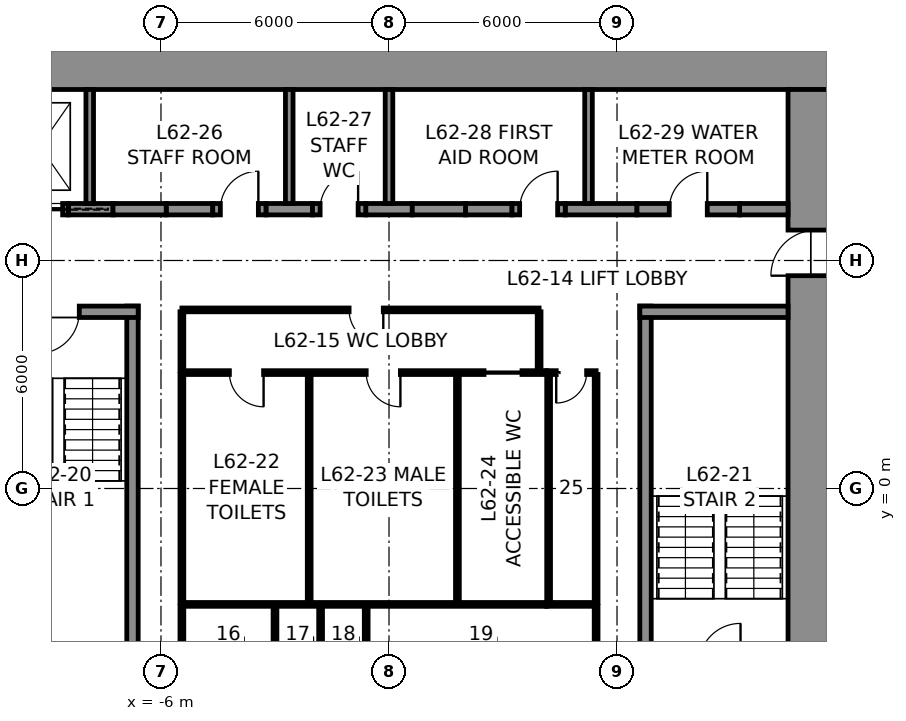
"""IFC4 building model, lengths in metres.
Left out: names, types, materials, properties, quantities, classifications, styles, units other than length and angle.
Written with IfcOpenShell. Run it as: python <this file> out.ifc"""

import sys

from ifc_helpers import new_model, si_unit, direction, frame, frame_2d, origin, place, context, subcontext, project, spatial, rectangle, extrude, element, fill, save


model = new_model("IFC4")
c1 = context("Model", 3, precision=1e-05, world=origin(), true_north=direction((0.0, 1.0)))
c2 = subcontext(c1, "Body", "Model", "MODEL_VIEW")
j1 = project(units=[si_unit("LENGTHUNIT", "METRE"), si_unit("PLANEANGLEUNIT", "RADIAN")], contexts=[c1])
p1 = place(None, origin())
s1 = spatial("IfcSite", under=j1, at=p1, CompositionType="ELEMENT")
p2 = place(p1, origin())
s2 = spatial("IfcBuilding", under=s1, at=p2, CompositionType="ELEMENT")
p3 = place(p2, frame((0.0, 0.0, 277.8)))
s3 = spatial("IfcBuildingStorey", under=s2, at=p3, CompositionType="ELEMENT", Elevation=277.8)
p4 = place(p3, frame((-12.0, 11.25, 0.0), z_axis=(0.0, 0.0, 1.0), x_axis=(1.0, 0.0, 0.0)))
e1 = element("IfcWall", 1, at=p4, inside=s3, PredefinedType="SHEAR", context=c2, shape_type="SweptSolid", body=[
    extrude(rectangle(XDim=24.0, YDim=1.5, at=frame_2d((12.0, 0.0))), origin(), (0.0, 0.0, 1.0), 4.0),
])
p5 = place(p3, frame((11.25, 10.5, 0.0), z_axis=(0.0, 0.0, 1.0), x_axis=(0.0, -1.0, 0.0)))
e2 = element("IfcWall", 2, at=p5, inside=s3, PredefinedType="SHEAR", context=c2, shape_type="SweptSolid", body=[
    extrude(rectangle(XDim=21.0, YDim=1.5, at=frame_2d((10.5, 0.0))), origin(), (0.0, 0.0, 1.0), 4.0),
])
p6 = place(p5, frame((3.7, 0.0, 0.0)))
e3 = element("IfcOpeningElement", 3, at=p6, cuts=e2, PredefinedType="OPENING", context=c2, shape_type="SweptSolid", body=[
    extrude(rectangle(XDim=1.2, YDim=2.3, at=frame_2d((0.6, 1.15))), frame((0.0, 0.76, 0.0), z_axis=(0.0, -1.0, 0.0), x_axis=(1.0, 0.0, 0.0)), (0.0, 0.0, 1.0), 1.52),
])
p7 = place(p5, frame((16.1, 0.0, 0.0)))
e4 = element("IfcOpeningElement", 4, at=p7, cuts=e2, PredefinedType="OPENING", context=c2, shape_type="SweptSolid", body=[
    extrude(rectangle(XDim=1.2, YDim=2.3, at=frame_2d((0.6, 1.15))), frame((0.0, 0.76, 0.0), z_axis=(0.0, -1.0, 0.0), x_axis=(1.0, 0.0, 0.0)), (0.0, 0.0, 1.0), 1.52),
])
p8 = place(p3, frame((-8.438, 7.35, 0.0), z_axis=(0.0, 0.0, 1.0), x_axis=(1.0, 0.0, 0.0)))
e5 = element("IfcWall", 5, at=p8, inside=s3, PredefinedType="SHEAR", context=c2, shape_type="SweptSolid", body=[
    extrude(rectangle(XDim=1.175, YDim=0.3, at=frame_2d((0.587, 0.0))), origin(), (0.0, 0.0, 1.0), 4.0),
])
for number, where, z_axis, x_axis in (
    (6, (-5.863, 7.35, 0.0), (0.0, 0.0, 1.0), (1.0, 0.0, 0.0)),
    (7, (-3.238, 7.35, 0.0), (0.0, 0.0, 1.0), (1.0, 0.0, 0.0)),
    (8, (-0.613, 7.35, 0.0), (0.0, 0.0, 1.0), (1.0, 0.0, 0.0)),
    (9, (2.012, 7.35, 0.0), (0.0, 0.0, 1.0), (1.0, 0.0, 0.0)),
):
    element("IfcWall", number, at=place(p3, frame(where, z_axis=z_axis, x_axis=x_axis)), inside=s3, PredefinedType="SHEAR", context=c2, shape_type="SweptSolid", body=[
        extrude(rectangle(XDim=1.225, YDim=0.3, at=frame_2d((0.613, 0.0))), origin(), (0.0, 0.0, 1.0), 4.0),
    ])
p9 = place(p3, frame((4.637, 7.35, 0.0), z_axis=(0.0, 0.0, 1.0), x_axis=(1.0, 0.0, 0.0)))
e10 = element("IfcWall", 10, at=p9, inside=s3, PredefinedType="SHEAR", context=c2, shape_type="SweptSolid", body=[
    extrude(rectangle(XDim=1.887, YDim=0.3, at=frame_2d((0.944, 0.0))), origin(), (0.0, 0.0, 1.0), 4.0),
])
p10 = place(p3, frame((9.225, 7.35, 0.0), z_axis=(0.0, 0.0, 1.0), x_axis=(1.0, 0.0, 0.0)))
e11 = element("IfcWall", 11, at=p10, inside=s3, PredefinedType="SHEAR", context=c2, shape_type="SweptSolid", body=[
    extrude(rectangle(XDim=1.275, YDim=0.3, at=frame_2d((0.637, 0.0))), origin(), (0.0, 0.0, 1.0), 4.0),
])
p11 = place(p3, frame((-9.938, 7.35, 0.0), z_axis=(0.0, 0.0, 1.0), x_axis=(1.0, 0.0, 0.0)))
e12 = element("IfcWall", 12, at=p11, inside=s3, PredefinedType="PARTITIONING", context=c2, shape_type="SweptSolid", body=[
    extrude(rectangle(XDim=1.5, YDim=0.3, at=frame_2d((0.75, 0.0))), origin(), (0.0, 0.0, 1.0), 4.0),
])
p12 = place(p11, frame((0.15, 0.0, 0.0)))
e13 = element("IfcOpeningElement", 13, at=p12, cuts=e12, PredefinedType="OPENING", context=c2, shape_type="SweptSolid", body=[
    extrude(rectangle(XDim=1.2, YDim=2.3, at=frame_2d((0.6, 1.15))), frame((0.0, 0.16, 0.0), z_axis=(0.0, -1.0, 0.0), x_axis=(1.0, 0.0, 0.0)), (0.0, 0.0, 1.0), 0.32),
])
p13 = place(p3, frame((-7.262, 7.35, 0.0), z_axis=(0.0, 0.0, 1.0), x_axis=(1.0, 0.0, 0.0)))
e14 = element("IfcWall", 14, at=p13, inside=s3, PredefinedType="PARTITIONING", context=c2, shape_type="SweptSolid", body=[
    extrude(rectangle(XDim=1.4, YDim=0.3, at=frame_2d((0.7, 0.0))), origin(), (0.0, 0.0, 1.0), 4.0),
])
p14 = place(p3, frame((-4.637, 7.35, 0.0), z_axis=(0.0, 0.0, 1.0), x_axis=(1.0, 0.0, 0.0)))
e15 = element("IfcWall", 15, at=p14, inside=s3, PredefinedType="PARTITIONING", context=c2, shape_type="SweptSolid", body=[
    extrude(rectangle(XDim=1.4, YDim=0.3, at=frame_2d((0.7, 0.0))), origin(), (0.0, 0.0, 1.0), 4.0),
])
p15 = place(p14, frame((0.2, 0.0, 0.0)))
e16 = element("IfcOpeningElement", 16, at=p15, cuts=e15, PredefinedType="OPENING", context=c2, shape_type="SweptSolid", body=[
    extrude(rectangle(XDim=1.0, YDim=2.3, at=frame_2d((0.5, 1.15))), frame((0.0, 0.16, 0.0), z_axis=(0.0, -1.0, 0.0), x_axis=(1.0, 0.0, 0.0)), (0.0, 0.0, 1.0), 0.32),
])
p16 = place(p3, frame((-2.012, 7.35, 0.0), z_axis=(0.0, 0.0, 1.0), x_axis=(1.0, 0.0, 0.0)))
e17 = element("IfcWall", 17, at=p16, inside=s3, PredefinedType="PARTITIONING", context=c2, shape_type="SweptSolid", body=[
    extrude(rectangle(XDim=1.4, YDim=0.3, at=frame_2d((0.7, 0.0))), origin(), (0.0, 0.0, 1.0), 4.0),
])
p17 = place(p16, frame((0.2, 0.0, 0.0)))
e18 = element("IfcOpeningElement", 18, at=p17, cuts=e17, PredefinedType="OPENING", context=c2, shape_type="SweptSolid", body=[
    extrude(rectangle(XDim=1.0, YDim=2.3, at=frame_2d((0.5, 1.15))), frame((0.0, 0.16, 0.0), z_axis=(0.0, -1.0, 0.0), x_axis=(1.0, 0.0, 0.0)), (0.0, 0.0, 1.0), 0.32),
])
p18 = place(p3, frame((0.613, 7.35, 0.0), z_axis=(0.0, 0.0, 1.0), x_axis=(1.0, 0.0, 0.0)))
e19 = element("IfcWall", 19, at=p18, inside=s3, PredefinedType="PARTITIONING", context=c2, shape_type="SweptSolid", body=[
    extrude(rectangle(XDim=1.4, YDim=0.3, at=frame_2d((0.7, 0.0))), origin(), (0.0, 0.0, 1.0), 4.0),
])
p19 = place(p3, frame((3.238, 7.35, 0.0), z_axis=(0.0, 0.0, 1.0), x_axis=(1.0, 0.0, 0.0)))
e20 = element("IfcWall", 20, at=p19, inside=s3, PredefinedType="PARTITIONING", context=c2, shape_type="SweptSolid", body=[
    extrude(rectangle(XDim=1.4, YDim=0.3, at=frame_2d((0.7, 0.0))), origin(), (0.0, 0.0, 1.0), 4.0),
])
p20 = place(p19, frame((0.2, 0.0, 0.0)))
e21 = element("IfcOpeningElement", 21, at=p20, cuts=e20, PredefinedType="OPENING", context=c2, shape_type="SweptSolid", body=[
    extrude(rectangle(XDim=1.0, YDim=2.3, at=frame_2d((0.5, 1.15))), frame((0.0, 0.16, 0.0), z_axis=(0.0, -1.0, 0.0), x_axis=(1.0, 0.0, 0.0)), (0.0, 0.0, 1.0), 0.32),
])
p21 = place(p3, frame((6.525, 7.35, 0.0), z_axis=(0.0, 0.0, 1.0), x_axis=(1.0, 0.0, 0.0)))
e22 = element("IfcWall", 22, at=p21, inside=s3, PredefinedType="PARTITIONING", context=c2, shape_type="SweptSolid", body=[
    extrude(rectangle(XDim=2.7, YDim=0.3, at=frame_2d((1.35, 0.0))), origin(), (0.0, 0.0, 1.0), 4.0),
])
p22 = place(p21, frame((0.85, 0.0, 0.0)))
e23 = element("IfcOpeningElement", 23, at=p22, cuts=e22, PredefinedType="OPENING", context=c2, shape_type="SweptSolid", body=[
    extrude(rectangle(XDim=1.0, YDim=2.3, at=frame_2d((0.5, 1.15))), frame((0.0, 0.16, 0.0), z_axis=(0.0, -1.0, 0.0), x_axis=(1.0, 0.0, 0.0)), (0.0, 0.0, 1.0), 0.32),
])
for number, where, z_axis, x_axis in (
    (24, (-7.875, 7.5, 0.0), (0.0, 0.0, 1.0), (0.0, 1.0, 0.0)),
    (25, (-2.625, 7.5, 0.0), (0.0, 0.0, 1.0), (0.0, 1.0, 0.0)),
    (26, (0.0, 7.5, 0.0), (0.0, 0.0, 1.0), (0.0, 1.0, 0.0)),
    (27, (5.25, 7.5, 0.0), (0.0, 0.0, 1.0), (0.0, 1.0, 0.0)),
):
    element("IfcWall", number, at=place(p3, frame(where, z_axis=z_axis, x_axis=x_axis)), inside=s3, PredefinedType="PARTITIONING", context=c2, shape_type="SweptSolid", body=[
        extrude(rectangle(XDim=3.0, YDim=0.2, at=frame_2d((1.5, 0.0))), origin(), (0.0, 0.0, 1.0), 4.0),
    ])
p23 = place(p3, frame((-6.75, -4.8, 0.0), z_axis=(0.0, 0.0, 1.0), x_axis=(0.0, 1.0, 0.0)))
e28 = element("IfcWall", 28, at=p23, inside=s3, PredefinedType="SOLIDWALL", context=c2, shape_type="SweptSolid", body=[
    extrude(rectangle(XDim=9.6, YDim=0.3, at=frame_2d((4.8, 0.0))), origin(), (0.0, 0.0, 1.0), 3.75),
])
p24 = place(p3, frame((-10.5, 4.65, 0.0), z_axis=(0.0, 0.0, 1.0), x_axis=(1.0, 0.0, 0.0)))
e29 = element("IfcWall", 29, at=p24, inside=s3, PredefinedType="SOLIDWALL", context=c2, shape_type="SweptSolid", body=[
    extrude(rectangle(XDim=3.9, YDim=0.3, at=frame_2d((1.95, 0.0))), origin(), (0.0, 0.0, 1.0), 3.75),
])
p25 = place(p24, frame((1.25, 0.0, 0.0)))
e30 = element("IfcOpeningElement", 30, at=p25, cuts=e29, PredefinedType="OPENING", context=c2, shape_type="SweptSolid", body=[
    extrude(rectangle(XDim=1.1, YDim=2.3, at=frame_2d((0.55, 1.15))), frame((0.0, 0.16, 0.0), z_axis=(0.0, -1.0, 0.0), x_axis=(1.0, 0.0, 0.0)), (0.0, 0.0, 1.0), 0.32),
])
p26 = place(p3, frame((6.75, -4.8, 0.0), z_axis=(0.0, 0.0, 1.0), x_axis=(0.0, 1.0, 0.0)))
e31 = element("IfcWall", 31, at=p26, inside=s3, PredefinedType="SOLIDWALL", context=c2, shape_type="SweptSolid", body=[
    extrude(rectangle(XDim=9.6, YDim=0.3, at=frame_2d((4.8, 0.0))), origin(), (0.0, 0.0, 1.0), 3.75),
])
p27 = place(p3, frame((6.6, 4.65, 0.0), z_axis=(0.0, 0.0, 1.0), x_axis=(1.0, 0.0, 0.0)))
e32 = element("IfcWall", 32, at=p27, inside=s3, PredefinedType="SOLIDWALL", context=c2, shape_type="SweptSolid", body=[
    extrude(rectangle(XDim=3.9, YDim=0.3, at=frame_2d((1.95, 0.0))), origin(), (0.0, 0.0, 1.0), 3.75),
])
p28 = place(p3, frame((-5.45, 3.05, 0.0), z_axis=(0.0, 0.0, 1.0), x_axis=(1.0, 0.0, 0.0)))
e33 = element("IfcWall", 33, at=p28, inside=s3, PredefinedType="PARTITIONING", context=c2, shape_type="SweptSolid", body=[
    extrude(rectangle(XDim=9.6, YDim=0.1, at=frame_2d((4.8, 0.0))), origin(), (0.0, 0.0, 1.0), 3.75),
])
p29 = place(p28, frame((1.25, 0.0, 0.0)))
e34 = element("IfcOpeningElement", 34, at=p29, cuts=e33, PredefinedType="OPENING", context=c2, shape_type="SweptSolid", body=[
    extrude(rectangle(XDim=0.9, YDim=2.3, at=frame_2d((0.45, 1.15))), frame((0.0, 0.06, 0.0), z_axis=(0.0, -1.0, 0.0), x_axis=(1.0, 0.0, 0.0)), (0.0, 0.0, 1.0), 0.12),
])
p30 = place(p28, frame((4.85, 0.0, 0.0)))
e35 = element("IfcOpeningElement", 35, at=p30, cuts=e33, PredefinedType="OPENING", context=c2, shape_type="SweptSolid", body=[
    extrude(rectangle(XDim=0.9, YDim=2.3, at=frame_2d((0.45, 1.15))), frame((0.0, 0.06, 0.0), z_axis=(0.0, -1.0, 0.0), x_axis=(1.0, 0.0, 0.0)), (0.0, 0.0, 1.0), 0.12),
])
p31 = place(p28, frame((7.95, 0.0, 0.0)))
e36 = element("IfcOpeningElement", 36, at=p31, cuts=e33, PredefinedType="OPENING", context=c2, shape_type="SweptSolid", body=[
    extrude(rectangle(XDim=1.0, YDim=2.3, at=frame_2d((0.5, 1.15))), frame((0.0, 0.06, 0.0), z_axis=(0.0, -1.0, 0.0), x_axis=(1.0, 0.0, 0.0)), (0.0, 0.0, 1.0), 0.12),
])
p32 = place(p3, frame((4.15, 3.05, 0.0), z_axis=(0.0, 0.0, 1.0), x_axis=(1.0, 0.0, 0.0)))
e37 = element("IfcWall", 37, at=p32, inside=s3, PredefinedType="PARTITIONING", context=c2, shape_type="SweptSolid", body=[
    extrude(rectangle(XDim=1.3, YDim=0.1, at=frame_2d((0.65, 0.0))), origin(), (0.0, 0.0, 1.0), 3.75),
])
p33 = place(p32, frame((0.25, 0.0, 0.0)))
e38 = element("IfcOpeningElement", 38, at=p33, cuts=e37, PredefinedType="OPENING", context=c2, shape_type="SweptSolid", body=[
    extrude(rectangle(XDim=0.8, YDim=2.3, at=frame_2d((0.4, 1.15))), frame((0.0, 0.06, 0.0), z_axis=(0.0, -1.0, 0.0), x_axis=(1.0, 0.0, 0.0)), (0.0, 0.0, 1.0), 0.12),
])
p34 = place(p3, frame((4.15, -3.05, 0.0), z_axis=(0.0, 0.0, 1.0), x_axis=(-1.0, 0.0, 0.0)))
e39 = element("IfcWall", 39, at=p34, inside=s3, PredefinedType="PARTITIONING", context=c2, shape_type="SweptSolid", body=[
    extrude(rectangle(XDim=9.6, YDim=0.1, at=frame_2d((4.8, 0.0))), origin(), (0.0, 0.0, 1.0), 3.75),
])
p35 = place(p3, frame((5.45, -3.05, 0.0), z_axis=(0.0, 0.0, 1.0), x_axis=(-1.0, 0.0, 0.0)))
e40 = element("IfcWall", 40, at=p35, inside=s3, PredefinedType="PARTITIONING", context=c2, shape_type="SweptSolid", body=[
    extrude(rectangle(XDim=1.3, YDim=0.1, at=frame_2d((0.65, 0.0))), origin(), (0.0, 0.0, 1.0), 3.75),
])
for number, where, z_axis, x_axis in (
    (41, (5.45, 3.0, 0.0), (0.0, 0.0, 1.0), (0.0, -1.0, 0.0)),
    (42, (-5.45, -3.0, 0.0), (0.0, 0.0, 1.0), (0.0, 1.0, 0.0)),
    (43, (-2.1, -3.0, 0.0), (0.0, 0.0, 1.0), (0.0, 1.0, 0.0)),
    (44, (1.8, -3.0, 0.0), (0.0, 0.0, 1.0), (0.0, 1.0, 0.0)),
    (45, (4.2, -3.0, 0.0), (0.0, 0.0, 1.0), (0.0, 1.0, 0.0)),
):
    element("IfcWall", number, at=place(p3, frame(where, z_axis=z_axis, x_axis=x_axis)), inside=s3, PredefinedType="PARTITIONING", context=c2, shape_type="SweptSolid", body=[
        extrude(rectangle(XDim=6.0, YDim=0.1, at=frame_2d((3.0, 0.0))), origin(), (0.0, 0.0, 1.0), 3.75),
    ])
p36 = place(p3, frame((-5.45, 4.7, 0.0), z_axis=(0.0, 0.0, 1.0), x_axis=(1.0, 0.0, 0.0)))
e46 = element("IfcWall", 46, at=p36, inside=s3, PredefinedType="PARTITIONING", context=c2, shape_type="SweptSolid", body=[
    extrude(rectangle(XDim=9.4, YDim=0.1, at=frame_2d((4.7, 0.0))), origin(), (0.0, 0.0, 1.0), 3.75),
])
p37 = place(p36, frame((4.4, 0.0, 0.0)))
e47 = element("IfcOpeningElement", 47, at=p37, cuts=e46, PredefinedType="OPENING", context=c2, shape_type="SweptSolid", body=[
    extrude(rectangle(XDim=0.9, YDim=2.3, at=frame_2d((0.45, 1.15))), frame((0.0, 0.06, 0.0), z_axis=(0.0, -1.0, 0.0), x_axis=(1.0, 0.0, 0.0)), (0.0, 0.0, 1.0), 0.12),
])
for number, where, z_axis, x_axis in (
    (48, (-5.45, 3.1, 0.0), (0.0, 0.0, 1.0), (0.0, 1.0, 0.0)),
    (49, (3.95, 3.1, 0.0), (0.0, 0.0, 1.0), (0.0, 1.0, 0.0)),
    (50, (-5.45, -3.1, 0.0), (0.0, 0.0, 1.0), (0.0, -1.0, 0.0)),
    (51, (5.45, -3.1, 0.0), (0.0, 0.0, 1.0), (0.0, -1.0, 0.0)),
    (52, (-3.0, -3.1, 0.0), (0.0, 0.0, 1.0), (0.0, -1.0, 0.0)),
    (53, (-1.8, -3.1, 0.0), (0.0, 0.0, 1.0), (0.0, -1.0, 0.0)),
    (54, (-0.6, -3.1, 0.0), (0.0, 0.0, 1.0), (0.0, -1.0, 0.0)),
):
    element("IfcWall", number, at=place(p3, frame(where, z_axis=z_axis, x_axis=x_axis)), inside=s3, PredefinedType="PARTITIONING", context=c2, shape_type="SweptSolid", body=[
        extrude(rectangle(XDim=1.55, YDim=0.1, at=frame_2d((0.775, 0.0))), origin(), (0.0, 0.0, 1.0), 3.75),
    ])
p38 = place(p25, frame((1.1, 0.0, 0.0), z_axis=(0.0, 0.0, 1.0), x_axis=(-1.0, 0.0, 0.0)))
e55 = element("IfcDoor", 55, at=p38, inside=s3, OperationType="SINGLE_SWING_RIGHT", PredefinedType="DOOR", context=c2, shape_type="SweptSolid", body=[
    extrude(rectangle(XDim=1.1, YDim=2.3, at=frame_2d((0.55, 1.15))), frame((0.0, 0.025, 0.0), z_axis=(0.0, -1.0, 0.0), x_axis=(1.0, 0.0, 0.0)), (0.0, 0.0, 1.0), 0.05),
])
fill(e30, e55)
p39 = place(p29, frame((0.9, 0.0, 0.0), z_axis=(0.0, 0.0, 1.0), x_axis=(-1.0, 0.0, 0.0)))
e56 = element("IfcDoor", 56, at=p39, inside=s3, OperationType="SINGLE_SWING_LEFT", PredefinedType="DOOR", context=c2, shape_type="SweptSolid", body=[
    extrude(rectangle(XDim=0.9, YDim=2.3, at=frame_2d((0.45, 1.15))), frame((0.0, 0.025, 0.0), z_axis=(0.0, -1.0, 0.0), x_axis=(1.0, 0.0, 0.0)), (0.0, 0.0, 1.0), 0.05),
])
fill(e34, e56)
p40 = place(p30, frame((0.9, 0.0, 0.0), z_axis=(0.0, 0.0, 1.0), x_axis=(-1.0, 0.0, 0.0)))
e57 = element("IfcDoor", 57, at=p40, inside=s3, OperationType="SINGLE_SWING_LEFT", PredefinedType="DOOR", context=c2, shape_type="SweptSolid", body=[
    extrude(rectangle(XDim=0.9, YDim=2.3, at=frame_2d((0.45, 1.15))), frame((0.0, 0.025, 0.0), z_axis=(0.0, -1.0, 0.0), x_axis=(1.0, 0.0, 0.0)), (0.0, 0.0, 1.0), 0.05),
])
fill(e35, e57)
p41 = place(p31, frame((1.0, 0.0, 0.0), z_axis=(0.0, 0.0, 1.0), x_axis=(-1.0, 0.0, 0.0)))
e58 = element("IfcDoor", 58, at=p41, inside=s3, OperationType="SLIDING_TO_LEFT", PredefinedType="DOOR", context=c2, shape_type="SweptSolid", body=[
    extrude(rectangle(XDim=1.0, YDim=2.3, at=frame_2d((0.5, 1.15))), frame((0.0, 0.025, 0.0), z_axis=(0.0, -1.0, 0.0), x_axis=(1.0, 0.0, 0.0)), (0.0, 0.0, 1.0), 0.05),
])
fill(e36, e58)
p42 = place(p33, frame((0.8, 0.0, 0.0), z_axis=(0.0, 0.0, 1.0), x_axis=(-1.0, 0.0, 0.0)))
e59 = element("IfcDoor", 59, at=p42, inside=s3, OperationType="SINGLE_SWING_RIGHT", PredefinedType="DOOR", context=c2, shape_type="SweptSolid", body=[
    extrude(rectangle(XDim=0.8, YDim=2.3, at=frame_2d((0.4, 1.15))), frame((0.0, 0.025, 0.0), z_axis=(0.0, -1.0, 0.0), x_axis=(1.0, 0.0, 0.0)), (0.0, 0.0, 1.0), 0.05),
])
fill(e38, e59)
p43 = place(p37, frame((0.9, 0.0, 0.0), z_axis=(0.0, 0.0, 1.0), x_axis=(-1.0, 0.0, 0.0)))
e60 = element("IfcDoor", 60, at=p43, inside=s3, OperationType="SINGLE_SWING_LEFT", PredefinedType="DOOR", context=c2, shape_type="SweptSolid", body=[
    extrude(rectangle(XDim=0.9, YDim=2.3, at=frame_2d((0.45, 1.15))), frame((0.0, 0.025, 0.0), z_axis=(0.0, -1.0, 0.0), x_axis=(1.0, 0.0, 0.0)), (0.0, 0.0, 1.0), 0.05),
])
fill(e47, e60)
p44 = place(p15, origin())
e61 = element("IfcDoor", 61, at=p44, inside=s3, OperationType="SINGLE_SWING_RIGHT", PredefinedType="DOOR", context=c2, shape_type="SweptSolid", body=[
    extrude(rectangle(XDim=1.0, YDim=2.3, at=frame_2d((0.5, 1.15))), frame((0.0, 0.025, 0.0), z_axis=(0.0, -1.0, 0.0), x_axis=(1.0, 0.0, 0.0)), (0.0, 0.0, 1.0), 0.05),
])
fill(e16, e61)
p45 = place(p17, origin())
e62 = element("IfcDoor", 62, at=p45, inside=s3, OperationType="SINGLE_SWING_RIGHT", PredefinedType="DOOR", context=c2, shape_type="SweptSolid", body=[
    extrude(rectangle(XDim=1.0, YDim=2.3, at=frame_2d((0.5, 1.15))), frame((0.0, 0.025, 0.0), z_axis=(0.0, -1.0, 0.0), x_axis=(1.0, 0.0, 0.0)), (0.0, 0.0, 1.0), 0.05),
])
fill(e18, e62)
p46 = place(p20, origin())
e63 = element("IfcDoor", 63, at=p46, inside=s3, OperationType="SINGLE_SWING_RIGHT", PredefinedType="DOOR", context=c2, shape_type="SweptSolid", body=[
    extrude(rectangle(XDim=1.0, YDim=2.3, at=frame_2d((0.5, 1.15))), frame((0.0, 0.025, 0.0), z_axis=(0.0, -1.0, 0.0), x_axis=(1.0, 0.0, 0.0)), (0.0, 0.0, 1.0), 0.05),
])
fill(e21, e63)
p47 = place(p22, origin())
e64 = element("IfcDoor", 64, at=p47, inside=s3, OperationType="SINGLE_SWING_RIGHT", PredefinedType="DOOR", context=c2, shape_type="SweptSolid", body=[
    extrude(rectangle(XDim=1.0, YDim=2.3, at=frame_2d((0.5, 1.15))), frame((0.0, 0.025, 0.0), z_axis=(0.0, -1.0, 0.0), x_axis=(1.0, 0.0, 0.0)), (0.0, 0.0, 1.0), 0.05),
])
fill(e23, e64)
p48 = place(p6, frame((1.2, 0.0, 0.0), z_axis=(0.0, 0.0, 1.0), x_axis=(-1.0, 0.0, 0.0)))
e65 = element("IfcDoor", 65, at=p48, inside=s3, OperationType="SINGLE_SWING_LEFT", PredefinedType="DOOR", context=c2, shape_type="SweptSolid", body=[
    extrude(rectangle(XDim=1.2, YDim=2.3, at=frame_2d((0.6, 1.15))), frame((0.0, 0.025, 0.0), z_axis=(0.0, -1.0, 0.0), x_axis=(1.0, 0.0, 0.0)), (0.0, 0.0, 1.0), 0.05),
])
fill(e3, e65)
p49 = place(p12, frame((1.2, 0.0, 0.0), z_axis=(0.0, 0.0, 1.0), x_axis=(-1.0, 0.0, 0.0)))
e66 = element("IfcDoor", 66, at=p49, inside=s3, OperationType="SLIDING_TO_LEFT", PredefinedType="DOOR", context=c2, shape_type="SweptSolid", body=[
    extrude(rectangle(XDim=1.2, YDim=2.3, at=frame_2d((0.6, 1.15))), frame((0.0, 0.025, 0.0), z_axis=(0.0, -1.0, 0.0), x_axis=(1.0, 0.0, 0.0)), (0.0, 0.0, 1.0), 0.05),
])
fill(e13, e66)
save(model, sys.argv[1])
